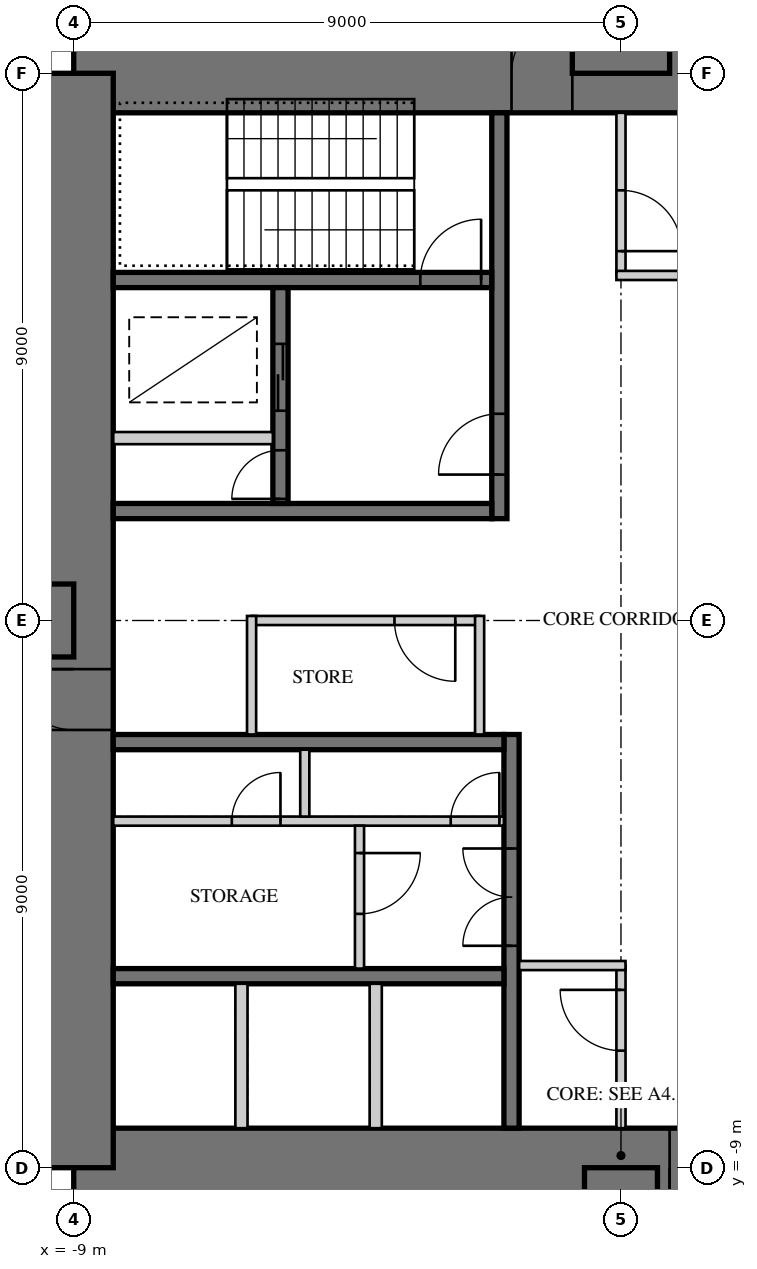
"""IFC4 building model, lengths in metres.
Left out: names, types, materials, properties, quantities, classifications, styles, units other than length and angle.
Written with IfcOpenShell. Run it as: python <this file> out.ifc"""

import sys

from ifc_helpers import new_model, si_unit, direction, frame, frame_2d, origin, place, context, subcontext, project, spatial, rectangle, extrude, element, fill, save


model = new_model("IFC4")
c1 = context("Model", 3, precision=1e-05, world=origin(), true_north=direction((0.0, 1.0)))
c2 = subcontext(c1, "Body", "Model", "MODEL_VIEW")
j1 = project(units=[si_unit("LENGTHUNIT", "METRE"), si_unit("PLANEANGLEUNIT", "RADIAN")], contexts=[c1])
p1 = place(None, origin())
s1 = spatial("IfcSite", under=j1, at=p1, CompositionType="ELEMENT")
p2 = place(p1, origin())
s2 = spatial("IfcBuilding", under=s1, at=p2, CompositionType="ELEMENT")
p3 = place(p2, frame((0.0, 0.0, 104.5)))
s3 = spatial("IfcBuildingStorey", under=s2, at=p3, CompositionType="ELEMENT", Elevation=104.5)
p4 = place(p3, frame((9.0, 9.0, 0.0), z_axis=(0.0, 0.0, 1.0), x_axis=(-1.0, 0.0, 0.0)))
e1 = element("IfcWall", 1, at=p4, inside=s3, PredefinedType="SHEAR", context=c2, shape_type="SweptSolid", body=[
    extrude(rectangle(XDim=18.0, YDim=1.3, at=frame_2d((9.0, 0.0))), origin(), (0.0, 0.0, 1.0), 4.0),
])
p5 = place(p4, frame((9.8, 0.0, 0.0)))
e2 = element("IfcOpeningElement", 2, at=p5, cuts=e1, PredefinedType="OPENING", context=c2, shape_type="SweptSolid", body=[
    extrude(rectangle(XDim=1.0, YDim=2.4, at=frame_2d((0.5, 1.2))), frame((0.0, 0.66, 0.0), z_axis=(0.0, -1.0, 0.0), x_axis=(1.0, 0.0, 0.0)), (0.0, 0.0, 1.0), 1.32),
])
p6 = place(p3, frame((-9.0, -9.0, 0.0), z_axis=(0.0, 0.0, 1.0), x_axis=(1.0, 0.0, 0.0)))
e3 = element("IfcWall", 3, at=p6, inside=s3, PredefinedType="SHEAR", context=c2, shape_type="SweptSolid", body=[
    extrude(rectangle(XDim=18.0, YDim=1.3, at=frame_2d((9.0, 0.0))), origin(), (0.0, 0.0, 1.0), 4.0),
])
p7 = place(p6, frame((9.8, 0.0, 0.0)))
e4 = element("IfcOpeningElement", 4, at=p7, cuts=e3, PredefinedType="OPENING", context=c2, shape_type="SweptSolid", body=[
    extrude(rectangle(XDim=1.0, YDim=2.4, at=frame_2d((0.5, 1.2))), frame((0.0, 0.66, 0.0), z_axis=(0.0, -1.0, 0.0), x_axis=(1.0, 0.0, 0.0)), (0.0, 0.0, 1.0), 1.32),
])
p8 = place(p3, frame((-9.0, 9.0, 0.0), z_axis=(0.0, 0.0, 1.0), x_axis=(0.0, -1.0, 0.0)))
e5 = element("IfcWall", 5, at=p8, inside=s3, PredefinedType="SHEAR", context=c2, shape_type="SweptSolid", body=[
    extrude(rectangle(XDim=18.0, YDim=1.3, at=frame_2d((9.0, 0.0))), origin(), (0.0, 0.0, 1.0), 4.0),
])
p9 = place(p8, frame((9.8, 0.0, 0.0)))
e6 = element("IfcOpeningElement", 6, at=p9, cuts=e5, PredefinedType="OPENING", context=c2, shape_type="SweptSolid", body=[
    extrude(rectangle(XDim=1.0, YDim=2.4, at=frame_2d((0.5, 1.2))), frame((0.0, 0.66, 0.0), z_axis=(0.0, -1.0, 0.0), x_axis=(1.0, 0.0, 0.0)), (0.0, 0.0, 1.0), 1.32),
])
p10 = place(p3, frame((-2.0, 1.675, 0.0), z_axis=(0.0, 0.0, 1.0), x_axis=(0.0, 1.0, 0.0)))
e7 = element("IfcWall", 7, at=p10, inside=s3, PredefinedType="SHEAR", context=c2, shape_type="SweptSolid", body=[
    extrude(rectangle(XDim=6.675, YDim=0.25, at=frame_2d((3.337, 0.0))), origin(), (0.0, 0.0, 1.0), 4.0),
])
p11 = place(p10, frame((0.725, 0.0, 0.0)))
e8 = element("IfcOpeningElement", 8, at=p11, cuts=e7, PredefinedType="OPENING", context=c2, shape_type="SweptSolid", body=[
    extrude(rectangle(XDim=1.0, YDim=2.1, at=frame_2d((0.5, 1.05))), frame((0.0, 0.135, 0.0), z_axis=(0.0, -1.0, 0.0), x_axis=(1.0, 0.0, 0.0)), (0.0, 0.0, 1.0), 0.27),
])
p12 = place(p3, frame((-2.125, 1.8, 0.0), z_axis=(0.0, 0.0, 1.0), x_axis=(-1.0, 0.0, 0.0)))
e9 = element("IfcWall", 9, at=p12, inside=s3, PredefinedType="SHEAR", context=c2, shape_type="SweptSolid", body=[
    extrude(rectangle(XDim=6.225, YDim=0.25, at=frame_2d((3.113, 0.0))), origin(), (0.0, 0.0, 1.0), 4.0),
])
p13 = place(p3, frame((-2.125, 5.6, 0.0), z_axis=(0.0, 0.0, 1.0), x_axis=(-1.0, 0.0, 0.0)))
e10 = element("IfcWall", 10, at=p13, inside=s3, PredefinedType="SHEAR", context=c2, shape_type="SweptSolid", body=[
    extrude(rectangle(XDim=6.225, YDim=0.25, at=frame_2d((3.113, 0.0))), origin(), (0.0, 0.0, 1.0), 4.0),
])
p14 = place(p13, frame((0.175, 0.0, 0.0)))
e11 = element("IfcOpeningElement", 11, at=p14, cuts=e10, PredefinedType="OPENING", context=c2, shape_type="SweptSolid", body=[
    extrude(rectangle(XDim=1.0, YDim=2.1, at=frame_2d((0.5, 1.05))), frame((0.0, 0.135, 0.0), z_axis=(0.0, -1.0, 0.0), x_axis=(1.0, 0.0, 0.0)), (0.0, 0.0, 1.0), 0.27),
])
p15 = place(p3, frame((-5.6, 1.925, 0.0), z_axis=(0.0, 0.0, 1.0), x_axis=(0.0, 1.0, 0.0)))
e12 = element("IfcWall", 12, at=p15, inside=s3, PredefinedType="SHEAR", context=c2, shape_type="SweptSolid", body=[
    extrude(rectangle(XDim=3.55, YDim=0.25, at=frame_2d((1.775, 0.0))), origin(), (0.0, 0.0, 1.0), 4.0),
])
p16 = place(p15, frame((1.525, 0.0, 0.0)))
e13 = element("IfcOpeningElement", 13, at=p16, cuts=e12, PredefinedType="OPENING", context=c2, shape_type="SweptSolid", body=[
    extrude(rectangle(XDim=1.1, YDim=2.2, at=frame_2d((0.55, 1.1))), frame((0.0, 0.135, 0.0), z_axis=(0.0, -1.0, 0.0), x_axis=(1.0, 0.0, 0.0)), (0.0, 0.0, 1.0), 0.27),
])
p17 = place(p15, frame((0.075, 0.0, 0.0)))
e14 = element("IfcOpeningElement", 14, at=p17, cuts=e12, PredefinedType="OPENING", context=c2, shape_type="SweptSolid", body=[
    extrude(rectangle(XDim=0.8, YDim=2.1, at=frame_2d((0.4, 1.05))), frame((0.0, 0.135, 0.0), z_axis=(0.0, -1.0, 0.0), x_axis=(1.0, 0.0, 0.0)), (0.0, 0.0, 1.0), 0.27),
])
p18 = place(p3, frame((-5.725, 3.0, 0.0), z_axis=(0.0, 0.0, 1.0), x_axis=(-1.0, 0.0, 0.0)))
e15 = element("IfcWall", 15, at=p18, inside=s3, PredefinedType="PARTITIONING", context=c2, shape_type="SweptSolid", body=[
    extrude(rectangle(XDim=2.625, YDim=0.2, at=frame_2d((1.312, 0.0))), origin(), (0.0, 0.0, 1.0), 4.0),
])
p19 = place(p3, frame((-1.8, -1.875, 0.0), z_axis=(0.0, 0.0, 1.0), x_axis=(0.0, -1.0, 0.0)))
e16 = element("IfcWall", 16, at=p19, inside=s3, PredefinedType="SHEAR", context=c2, shape_type="SweptSolid", body=[
    extrude(rectangle(XDim=6.475, YDim=0.25, at=frame_2d((3.238, 0.0))), origin(), (0.0, 0.0, 1.0), 4.0),
])
p20 = place(p19, frame((1.875, 0.0, 0.0)))
e17 = element("IfcOpeningElement", 17, at=p20, cuts=e16, PredefinedType="OPENING", context=c2, shape_type="SweptSolid", body=[
    extrude(rectangle(XDim=1.6, YDim=2.4, at=frame_2d((0.8, 1.2))), frame((0.0, 0.135, 0.0), z_axis=(0.0, -1.0, 0.0), x_axis=(1.0, 0.0, 0.0)), (0.0, 0.0, 1.0), 0.27),
])
for number, where, z_axis, x_axis in (
    (18, (-1.925, -2.0, 0.0), (0.0, 0.0, 1.0), (-1.0, 0.0, 0.0)),
    (19, (-1.925, -5.85, 0.0), (0.0, 0.0, 1.0), (-1.0, 0.0, 0.0)),
):
    element("IfcWall", number, at=place(p3, frame(where, z_axis=z_axis, x_axis=x_axis)), inside=s3, PredefinedType="SHEAR", context=c2, shape_type="SweptSolid", body=[
        extrude(rectangle(XDim=6.425, YDim=0.25, at=frame_2d((3.212, 0.0))), origin(), (0.0, 0.0, 1.0), 4.0),
    ])
p21 = place(p3, frame((-1.925, -3.3, 0.0), z_axis=(0.0, 0.0, 1.0), x_axis=(-1.0, 0.0, 0.0)))
e20 = element("IfcWall", 20, at=p21, inside=s3, PredefinedType="PARTITIONING", context=c2, shape_type="SweptSolid", body=[
    extrude(rectangle(XDim=6.425, YDim=0.15, at=frame_2d((3.212, 0.0))), origin(), (0.0, 0.0, 1.0), 4.0),
])
p22 = place(p21, frame((0.075, 0.0, 0.0)))
e21 = element("IfcOpeningElement", 21, at=p22, cuts=e20, PredefinedType="OPENING", context=c2, shape_type="SweptSolid", body=[
    extrude(rectangle(XDim=0.8, YDim=2.1, at=frame_2d((0.4, 1.05))), frame((0.0, 0.085, 0.0), z_axis=(0.0, -1.0, 0.0), x_axis=(1.0, 0.0, 0.0)), (0.0, 0.0, 1.0), 0.17),
])
p23 = place(p21, frame((3.675, 0.0, 0.0)))
e22 = element("IfcOpeningElement", 22, at=p23, cuts=e20, PredefinedType="OPENING", context=c2, shape_type="SweptSolid", body=[
    extrude(rectangle(XDim=0.8, YDim=2.1, at=frame_2d((0.4, 1.05))), frame((0.0, 0.085, 0.0), z_axis=(0.0, -1.0, 0.0), x_axis=(1.0, 0.0, 0.0)), (0.0, 0.0, 1.0), 0.17),
])
p24 = place(p3, frame((-5.2, -2.125, 0.0), z_axis=(0.0, 0.0, 1.0), x_axis=(0.0, -1.0, 0.0)))
e23 = element("IfcWall", 23, at=p24, inside=s3, PredefinedType="PARTITIONING", context=c2, shape_type="SweptSolid", body=[
    extrude(rectangle(XDim=1.1, YDim=0.15, at=frame_2d((0.55, 0.0))), origin(), (0.0, 0.0, 1.0), 4.0),
])
for number, where, z_axis, x_axis in (
    (24, (-4.033, -5.975, 0.0), (0.0, 0.0, 1.0), (0.0, -1.0, 0.0)),
    (25, (-6.242, -5.975, 0.0), (0.0, 0.0, 1.0), (0.0, -1.0, 0.0)),
):
    element("IfcWall", number, at=place(p3, frame(where, z_axis=z_axis, x_axis=x_axis)), inside=s3, PredefinedType="PARTITIONING", context=c2, shape_type="SweptSolid", body=[
        extrude(rectangle(XDim=2.375, YDim=0.2, at=frame_2d((1.188, 0.0))), origin(), (0.0, 0.0, 1.0), 4.0),
    ])
p25 = place(p3, frame((0.0, 9.0, 0.0), z_axis=(0.0, 0.0, 1.0), x_axis=(0.0, 1.0, 0.0)))
e26 = element("IfcWall", 26, at=p25, inside=s3, PredefinedType="SHEAR", context=c2, shape_type="SweptSolid", body=[
    extrude(rectangle(XDim=9.0, YDim=1.6, at=frame_2d((4.5, 0.0))), origin(), (0.0, 0.0, 1.0), 4.0),
])
p26 = place(p25, frame((4.3, 0.0, 0.0)))
e27 = element("IfcOpeningElement", 27, at=p26, cuts=e26, PredefinedType="OPENING", context=c2, shape_type="SweptSolid", body=[
    extrude(rectangle(XDim=1.0, YDim=2.2, at=frame_2d((0.5, 1.1))), frame((0.0, 0.81, 0.0), z_axis=(0.0, -1.0, 0.0), x_axis=(1.0, 0.0, 0.0)), (0.0, 0.0, 1.0), 1.62),
])
p27 = place(p3, frame((0.0, -9.0, 0.0), z_axis=(0.0, 0.0, 1.0), x_axis=(0.0, -1.0, 0.0)))
e28 = element("IfcWall", 28, at=p27, inside=s3, PredefinedType="SHEAR", context=c2, shape_type="SweptSolid", body=[
    extrude(rectangle(XDim=18.0, YDim=1.2, at=frame_2d((9.0, 0.0))), origin(), (0.0, 0.0, 1.0), 4.0),
])
p28 = place(p27, frame((9.8, 0.0, 0.0)))
e29 = element("IfcOpeningElement", 29, at=p28, cuts=e28, PredefinedType="OPENING", context=c2, shape_type="SweptSolid", body=[
    extrude(rectangle(XDim=1.0, YDim=2.2, at=frame_2d((0.5, 1.1))), frame((0.0, 0.61, 0.0), z_axis=(0.0, -1.0, 0.0), x_axis=(1.0, 0.0, 0.0)), (0.0, 0.0, 1.0), 1.22),
])
p29 = place(p3, frame((-9.0, 0.0, 0.0), z_axis=(0.0, 0.0, 1.0), x_axis=(-1.0, 0.0, 0.0)))
e30 = element("IfcWall", 30, at=p29, inside=s3, PredefinedType="SHEAR", context=c2, shape_type="SweptSolid", body=[
    extrude(rectangle(XDim=18.0, YDim=1.2, at=frame_2d((9.0, 0.0))), origin(), (0.0, 0.0, 1.0), 4.0),
])
p30 = place(p29, frame((9.8, 0.0, 0.0)))
e31 = element("IfcOpeningElement", 31, at=p30, cuts=e30, PredefinedType="OPENING", context=c2, shape_type="SweptSolid", body=[
    extrude(rectangle(XDim=1.0, YDim=2.2, at=frame_2d((0.5, 1.1))), frame((0.0, 0.61, 0.0), z_axis=(0.0, -1.0, 0.0), x_axis=(1.0, 0.0, 0.0)), (0.0, 0.0, 1.0), 1.22),
])
p31 = place(p3, frame((-2.325, 0.0, 0.0), z_axis=(0.0, 0.0, 1.0), x_axis=(-1.0, 0.0, 0.0)))
e32 = element("IfcWall", 32, at=p31, inside=s3, PredefinedType="PARTITIONING", context=c2, shape_type="SweptSolid", body=[
    extrude(rectangle(XDim=3.75, YDim=0.15, at=frame_2d((1.875, 0.0))), origin(), (0.0, 0.0, 1.0), 3.8),
])
p32 = place(p31, frame((0.4, 0.0, 0.0)))
e33 = element("IfcOpeningElement", 33, at=p32, cuts=e32, PredefinedType="OPENING", context=c2, shape_type="SweptSolid", body=[
    extrude(rectangle(XDim=1.0, YDim=2.1, at=frame_2d((0.5, 1.05))), frame((0.0, 0.085, 0.0), z_axis=(0.0, -1.0, 0.0), x_axis=(1.0, 0.0, 0.0)), (0.0, 0.0, 1.0), 0.17),
])
for number, where, z_axis, x_axis in (
    (34, (-2.325, -1.875, 0.0), (0.0, 0.0, 1.0), (0.0, 1.0, 0.0)),
    (35, (-6.075, 0.075, 0.0), (0.0, 0.0, 1.0), (0.0, -1.0, 0.0)),
):
    element("IfcWall", number, at=place(p3, frame(where, z_axis=z_axis, x_axis=x_axis)), inside=s3, PredefinedType="PARTITIONING", context=c2, shape_type="SweptSolid", body=[
        extrude(rectangle(XDim=1.95, YDim=0.15, at=frame_2d((0.975, 0.0))), origin(), (0.0, 0.0, 1.0), 3.8),
    ])
p33 = place(p3, frame((0.0, 5.675, 0.0), z_axis=(0.0, 0.0, 1.0), x_axis=(0.0, 1.0, 0.0)))
e36 = element("IfcWall", 36, at=p33, inside=s3, PredefinedType="PARTITIONING", context=c2, shape_type="SweptSolid", body=[
    extrude(rectangle(XDim=2.675, YDim=0.15, at=frame_2d((1.337, 0.0))), origin(), (0.0, 0.0, 1.0), 3.8),
])
p34 = place(p33, frame((0.4, 0.0, 0.0)))
e37 = element("IfcOpeningElement", 37, at=p34, cuts=e36, PredefinedType="OPENING", context=c2, shape_type="SweptSolid", body=[
    extrude(rectangle(XDim=1.0, YDim=2.1, at=frame_2d((0.5, 1.05))), frame((0.0, 0.085, 0.0), z_axis=(0.0, -1.0, 0.0), x_axis=(1.0, 0.0, 0.0)), (0.0, 0.0, 1.0), 0.17),
])
p35 = place(p3, frame((1.675, 5.675, 0.0), z_axis=(0.0, 0.0, 1.0), x_axis=(-1.0, 0.0, 0.0)))
e38 = element("IfcWall", 38, at=p35, inside=s3, PredefinedType="PARTITIONING", context=c2, shape_type="SweptSolid", body=[
    extrude(rectangle(XDim=1.75, YDim=0.15, at=frame_2d((0.875, 0.0))), origin(), (0.0, 0.0, 1.0), 3.8),
])
p36 = place(p3, frame((0.0, -5.675, 0.0), z_axis=(0.0, 0.0, 1.0), x_axis=(0.0, -1.0, 0.0)))
e39 = element("IfcWall", 39, at=p36, inside=s3, PredefinedType="PARTITIONING", context=c2, shape_type="SweptSolid", body=[
    extrude(rectangle(XDim=2.675, YDim=0.15, at=frame_2d((1.337, 0.0))), origin(), (0.0, 0.0, 1.0), 3.8),
])
p37 = place(p36, frame((0.4, 0.0, 0.0)))
e40 = element("IfcOpeningElement", 40, at=p37, cuts=e39, PredefinedType="OPENING", context=c2, shape_type="SweptSolid", body=[
    extrude(rectangle(XDim=1.0, YDim=2.1, at=frame_2d((0.5, 1.05))), frame((0.0, 0.085, 0.0), z_axis=(0.0, -1.0, 0.0), x_axis=(1.0, 0.0, 0.0)), (0.0, 0.0, 1.0), 0.17),
])
p38 = place(p3, frame((-1.675, -5.675, 0.0), z_axis=(0.0, 0.0, 1.0), x_axis=(1.0, 0.0, 0.0)))
e41 = element("IfcWall", 41, at=p38, inside=s3, PredefinedType="PARTITIONING", context=c2, shape_type="SweptSolid", body=[
    extrude(rectangle(XDim=1.75, YDim=0.15, at=frame_2d((0.875, 0.0))), origin(), (0.0, 0.0, 1.0), 3.8),
])
p39 = place(p3, frame((-4.3, -3.375, 0.0), z_axis=(0.0, 0.0, 1.0), x_axis=(0.0, -1.0, 0.0)))
e42 = element("IfcWall", 42, at=p39, inside=s3, PredefinedType="PARTITIONING", context=c2, shape_type="SweptSolid", body=[
    extrude(rectangle(XDim=2.35, YDim=0.15, at=frame_2d((1.175, 0.0))), origin(), (0.0, 0.0, 1.0), 3.8),
])
p40 = place(p39, frame((0.45, 0.0, 0.0)))
e43 = element("IfcOpeningElement", 43, at=p40, cuts=e42, PredefinedType="OPENING", context=c2, shape_type="SweptSolid", body=[
    extrude(rectangle(XDim=1.0, YDim=2.1, at=frame_2d((0.5, 1.05))), frame((0.0, 0.085, 0.0), z_axis=(0.0, -1.0, 0.0), x_axis=(1.0, 0.0, 0.0)), (0.0, 0.0, 1.0), 0.17),
])
p41 = place(p32, origin())
e44 = element("IfcDoor", 44, at=p41, inside=s3, OperationType="SINGLE_SWING_LEFT", PredefinedType="DOOR", context=c2, shape_type="SweptSolid", body=[
    extrude(rectangle(XDim=1.0, YDim=2.1, at=frame_2d((0.5, 1.05))), frame((0.0, 0.025, 0.0), z_axis=(0.0, -1.0, 0.0), x_axis=(1.0, 0.0, 0.0)), (0.0, 0.0, 1.0), 0.05),
])
fill(e33, e44)
p42 = place(p34, frame((1.0, 0.0, 0.0), z_axis=(0.0, 0.0, 1.0), x_axis=(-1.0, 0.0, 0.0)))
e45 = element("IfcDoor", 45, at=p42, inside=s3, OperationType="SINGLE_SWING_RIGHT", PredefinedType="DOOR", context=c2, shape_type="SweptSolid", body=[
    extrude(rectangle(XDim=1.0, YDim=2.1, at=frame_2d((0.5, 1.05))), frame((0.0, 0.025, 0.0), z_axis=(0.0, -1.0, 0.0), x_axis=(1.0, 0.0, 0.0)), (0.0, 0.0, 1.0), 0.05),
])
fill(e37, e45)
p43 = place(p37, frame((1.0, 0.0, 0.0), z_axis=(0.0, 0.0, 1.0), x_axis=(-1.0, 0.0, 0.0)))
e46 = element("IfcDoor", 46, at=p43, inside=s3, OperationType="SINGLE_SWING_RIGHT", PredefinedType="DOOR", context=c2, shape_type="SweptSolid", body=[
    extrude(rectangle(XDim=1.0, YDim=2.1, at=frame_2d((0.5, 1.05))), frame((0.0, 0.025, 0.0), z_axis=(0.0, -1.0, 0.0), x_axis=(1.0, 0.0, 0.0)), (0.0, 0.0, 1.0), 0.05),
])
fill(e40, e46)
p44 = place(p40, origin())
e47 = element("IfcDoor", 47, at=p44, inside=s3, OperationType="SINGLE_SWING_LEFT", PredefinedType="DOOR", context=c2, shape_type="SweptSolid", body=[
    extrude(rectangle(XDim=1.0, YDim=2.1, at=frame_2d((0.5, 1.05))), frame((0.0, 0.025, 0.0), z_axis=(0.0, -1.0, 0.0), x_axis=(1.0, 0.0, 0.0)), (0.0, 0.0, 1.0), 0.05),
])
fill(e43, e47)
p45 = place(p5, frame((1.0, 0.0, 0.0), z_axis=(0.0, 0.0, 1.0), x_axis=(-1.0, 0.0, 0.0)))
e48 = element("IfcDoor", 48, at=p45, inside=s3, OperationType="SINGLE_SWING_RIGHT", PredefinedType="DOOR", context=c2, shape_type="SweptSolid", body=[
    extrude(rectangle(XDim=1.0, YDim=2.4, at=frame_2d((0.5, 1.2))), frame((0.0, -0.005, 0.0), z_axis=(0.0, -1.0, 0.0), x_axis=(1.0, 0.0, 0.0)), (0.0, 0.0, 1.0), 0.05),
])
fill(e2, e48)
p46 = place(p7, frame((1.0, 0.0, 0.0), z_axis=(0.0, 0.0, 1.0), x_axis=(-1.0, 0.0, 0.0)))
e49 = element("IfcDoor", 49, at=p46, inside=s3, OperationType="SINGLE_SWING_RIGHT", PredefinedType="DOOR", context=c2, shape_type="SweptSolid", body=[
    extrude(rectangle(XDim=1.0, YDim=2.4, at=frame_2d((0.5, 1.2))), frame((0.0, -0.005, 0.0), z_axis=(0.0, -1.0, 0.0), x_axis=(1.0, 0.0, 0.0)), (0.0, 0.0, 1.0), 0.05),
])
fill(e4, e49)
p47 = place(p9, frame((1.0, 0.0, 0.0), z_axis=(0.0, 0.0, 1.0), x_axis=(-1.0, 0.0, 0.0)))
e50 = element("IfcDoor", 50, at=p47, inside=s3, OperationType="SINGLE_SWING_RIGHT", PredefinedType="DOOR", context=c2, shape_type="SweptSolid", body=[
    extrude(rectangle(XDim=1.0, YDim=2.4, at=frame_2d((0.5, 1.2))), frame((0.0, -0.005, 0.0), z_axis=(0.0, -1.0, 0.0), x_axis=(1.0, 0.0, 0.0)), (0.0, 0.0, 1.0), 0.05),
])
fill(e6, e50)
p48 = place(p11, origin())
e51 = element("IfcDoor", 51, at=p48, inside=s3, OperationType="SINGLE_SWING_LEFT", PredefinedType="DOOR", context=c2, shape_type="SweptSolid", body=[
    extrude(rectangle(XDim=1.0, YDim=2.1, at=frame_2d((0.5, 1.05))), frame((0.0, 0.025, 0.0), z_axis=(0.0, -1.0, 0.0), x_axis=(1.0, 0.0, 0.0)), (0.0, 0.0, 1.0), 0.05),
])
fill(e8, e51)
p49 = place(p14, frame((1.0, 0.0, 0.0), z_axis=(0.0, 0.0, 1.0), x_axis=(-1.0, 0.0, 0.0)))
e52 = element("IfcDoor", 52, at=p49, inside=s3, OperationType="SINGLE_SWING_RIGHT", PredefinedType="DOOR", context=c2, shape_type="SweptSolid", body=[
    extrude(rectangle(XDim=1.0, YDim=2.1, at=frame_2d((0.5, 1.05))), frame((0.0, 0.025, 0.0), z_axis=(0.0, -1.0, 0.0), x_axis=(1.0, 0.0, 0.0)), (0.0, 0.0, 1.0), 0.05),
])
fill(e11, e52)
p50 = place(p16, origin())
e53 = element("IfcDoor", 53, at=p50, inside=s3, OperationType="DOUBLE_DOOR_SLIDING", PredefinedType="DOOR", context=c2, shape_type="SweptSolid", body=[
    extrude(rectangle(XDim=1.1, YDim=2.2, at=frame_2d((0.55, 1.1))), frame((0.0, 0.025, 0.0), z_axis=(0.0, -1.0, 0.0), x_axis=(1.0, 0.0, 0.0)), (0.0, 0.0, 1.0), 0.05),
])
fill(e13, e53)
p51 = place(p17, origin())
e54 = element("IfcDoor", 54, at=p51, inside=s3, OperationType="SINGLE_SWING_LEFT", PredefinedType="DOOR", context=c2, shape_type="SweptSolid", body=[
    extrude(rectangle(XDim=0.8, YDim=2.1, at=frame_2d((0.4, 1.05))), frame((0.0, 0.025, 0.0), z_axis=(0.0, -1.0, 0.0), x_axis=(1.0, 0.0, 0.0)), (0.0, 0.0, 1.0), 0.05),
])
fill(e14, e54)
p52 = place(p20, frame((1.6, 0.0, 0.0), z_axis=(0.0, 0.0, 1.0), x_axis=(-1.0, 0.0, 0.0)))
e55 = element("IfcDoor", 55, at=p52, inside=s3, OperationType="DOUBLE_DOOR_SINGLE_SWING", PredefinedType="DOOR", context=c2, shape_type="SweptSolid", body=[
    extrude(rectangle(XDim=1.6, YDim=2.4, at=frame_2d((0.8, 1.2))), frame((0.0, 0.025, 0.0), z_axis=(0.0, -1.0, 0.0), x_axis=(1.0, 0.0, 0.0)), (0.0, 0.0, 1.0), 0.05),
])
fill(e17, e55)
p53 = place(p22, frame((0.8, 0.0, 0.0), z_axis=(0.0, 0.0, 1.0), x_axis=(-1.0, 0.0, 0.0)))
e56 = element("IfcDoor", 56, at=p53, inside=s3, OperationType="SINGLE_SWING_RIGHT", PredefinedType="DOOR", context=c2, shape_type="SweptSolid", body=[
    extrude(rectangle(XDim=0.8, YDim=2.1, at=frame_2d((0.4, 1.05))), frame((0.0, 0.025, 0.0), z_axis=(0.0, -1.0, 0.0), x_axis=(1.0, 0.0, 0.0)), (0.0, 0.0, 1.0), 0.05),
])
fill(e21, e56)
p54 = place(p23, frame((0.8, 0.0, 0.0), z_axis=(0.0, 0.0, 1.0), x_axis=(-1.0, 0.0, 0.0)))
e57 = element("IfcDoor", 57, at=p54, inside=s3, OperationType="SINGLE_SWING_RIGHT", PredefinedType="DOOR", context=c2, shape_type="SweptSolid", body=[
    extrude(rectangle(XDim=0.8, YDim=2.1, at=frame_2d((0.4, 1.05))), frame((0.0, 0.025, 0.0), z_axis=(0.0, -1.0, 0.0), x_axis=(1.0, 0.0, 0.0)), (0.0, 0.0, 1.0), 0.05),
])
fill(e22, e57)
save(model, sys.argv[1])
